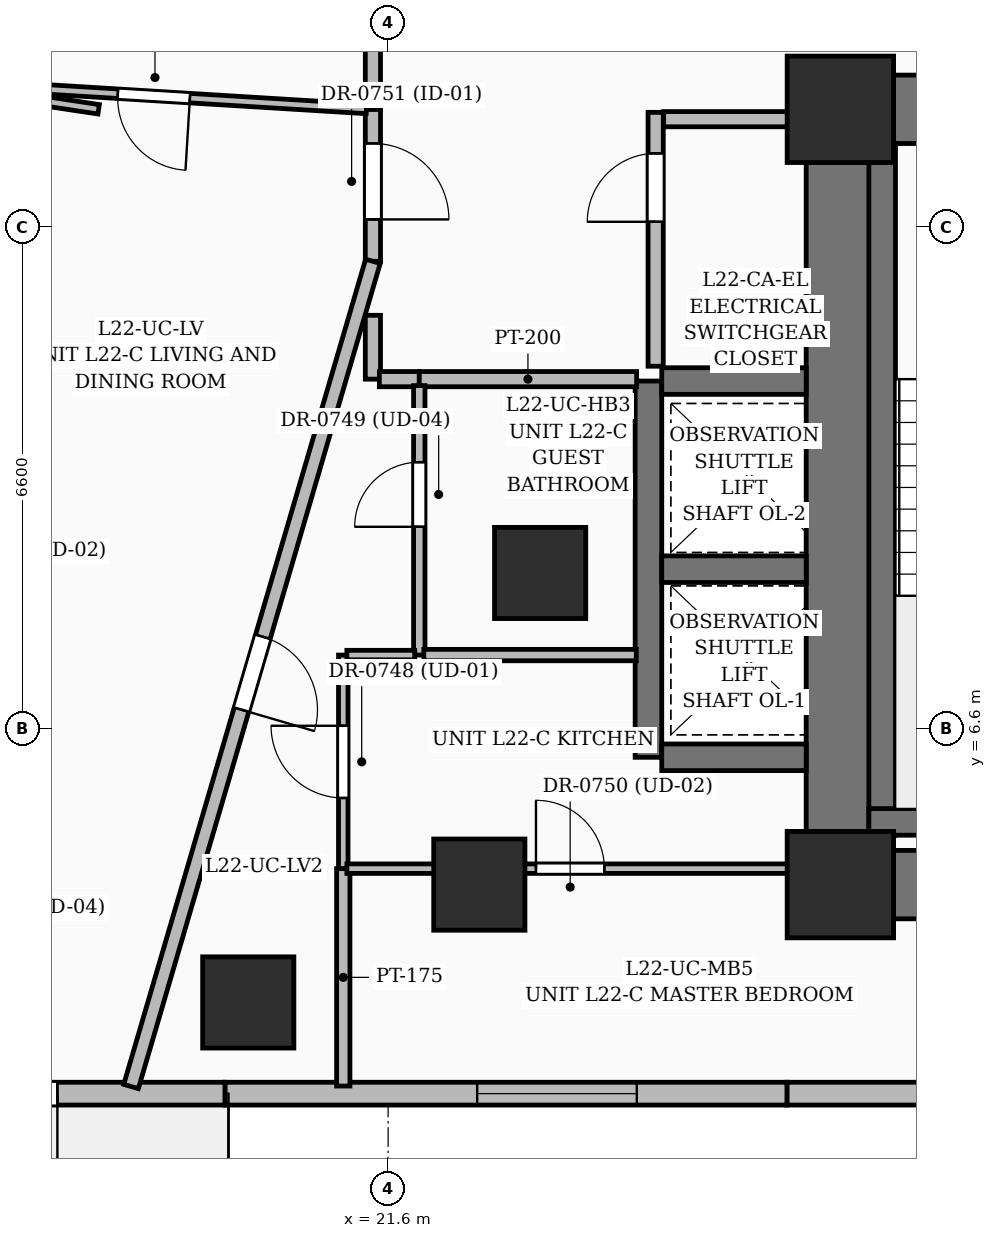
"""IFC4 building model, lengths in metres.
Left out: names, types, materials, properties, quantities, classifications, styles, units other than length and angle.
Written with IfcOpenShell. Run it as: python <this file> out.ifc"""

import sys

from ifc_helpers import new_model, si_unit, direction, frame, frame_2d, origin, origin_2d, place, context, subcontext, project, spatial, rectangle, extrude, element, fill, save


model = new_model("IFC4")
c1 = context("Model", 3, precision=1e-05, world=origin(), true_north=direction((0.0, 1.0)))
c2 = subcontext(c1, "Body", "Model", "MODEL_VIEW")
j1 = project(units=[si_unit("LENGTHUNIT", "METRE"), si_unit("PLANEANGLEUNIT", "RADIAN")], contexts=[c1])
p1 = place(None, origin())
s1 = spatial("IfcSite", under=j1, at=p1, CompositionType="ELEMENT")
p2 = place(p1, origin())
s2 = spatial("IfcBuilding", under=s1, at=p2, CompositionType="ELEMENT")
p3 = place(p2, frame((0.0, 0.0, 89.4)))
s3 = spatial("IfcBuildingStorey", under=s2, at=p3, CompositionType="ELEMENT", Elevation=89.4)
for number, where, z_axis, x_axis in (
    (1, (27.55, 4.55, 0.0), (0.0, 0.0, 1.0), (1.0, 0.0, 0.0)),
    (2, (27.55, 14.75, 0.0), (0.0, 0.0, 1.0), (1.0, 0.0, 0.0)),
):
    element("IfcColumn", number, at=place(p3, frame(where, z_axis=z_axis, x_axis=x_axis)), inside=s3, PredefinedType="COLUMN", context=c2, shape_type="SweptSolid", body=[
        extrude(rectangle(XDim=1.4, YDim=1.4, at=origin_2d()), origin(), (0.0, 0.0, 1.0), 3.6),
    ])
for number, where, z_axis, x_axis in (
    (3, (22.8, 4.55, 0.0), (0.0, 0.0, 1.0), (1.0, 0.0, 0.0)),
    (4, (23.6, 8.65, 0.0), (0.0, 0.0, 1.0), (1.0, 0.0, 0.0)),
):
    element("IfcColumn", number, at=place(p3, frame(where, z_axis=z_axis, x_axis=x_axis)), inside=s3, PredefinedType="COLUMN", context=c2, shape_type="SweptSolid", body=[
        extrude(rectangle(XDim=1.2, YDim=1.2, at=origin_2d()), origin(), (0.0, 0.0, 1.0), 3.6),
    ])
p4 = place(p3, frame((28.25, 4.55, 0.0), z_axis=(0.0, 0.0, 1.0), x_axis=(1.0, 0.0, 0.0)))
e5 = element("IfcWall", 5, at=p4, inside=s3, PredefinedType="SHEAR", context=c2, shape_type="SweptSolid", body=[
    extrude(rectangle(XDim=6.2, YDim=0.9, at=frame_2d((3.1, 0.0))), origin(), (0.0, 0.0, 1.0), 3.6),
])
p5 = place(p3, frame((28.25, 14.75, 0.0), z_axis=(0.0, 0.0, 1.0), x_axis=(1.0, 0.0, 0.0)))
e6 = element("IfcWall", 6, at=p5, inside=s3, PredefinedType="SHEAR", context=c2, shape_type="SweptSolid", body=[
    extrude(rectangle(XDim=6.2, YDim=0.9, at=frame_2d((3.1, 0.0))), origin(), (0.0, 0.0, 1.0), 3.6),
])
p6 = place(p5, frame((0.925, 0.0, 0.0)))
e7 = element("IfcOpeningElement", 7, at=p6, cuts=e6, PredefinedType="OPENING", context=c2, shape_type="SweptSolid", body=[
    extrude(rectangle(XDim=1.05, YDim=2.15, at=frame_2d((0.525, 1.075))), frame((0.0, 0.46, 0.0), z_axis=(0.0, -1.0, 0.0), x_axis=(1.0, 0.0, 0.0)), (0.0, 0.0, 1.0), 0.92),
])
p7 = place(p3, frame((27.55, 5.25, 0.0), z_axis=(0.0, 0.0, 1.0), x_axis=(0.0, 1.0, 0.0)))
e8 = element("IfcWall", 8, at=p7, inside=s3, PredefinedType="SHEAR", context=c2, shape_type="SweptSolid", body=[
    extrude(rectangle(XDim=8.8, YDim=0.9, at=frame_2d((4.4, 0.0))), origin(), (0.0, 0.0, 1.0), 3.6),
])
p8 = place(p3, frame((28.1, 5.2, 0.0), z_axis=(0.0, 0.0, 1.0), x_axis=(0.0, 1.0, 0.0)))
e9 = element("IfcWall", 9, at=p8, inside=s3, PredefinedType="SOLIDWALL", context=c2, shape_type="SweptSolid", body=[
    extrude(rectangle(XDim=9.1, YDim=0.35, at=frame_2d((4.55, 0.0))), origin(), (0.0, 0.0, 1.0), 3.6),
])
p9 = place(p3, frame((27.925, 5.375, 0.0), z_axis=(0.0, 0.0, 1.0), x_axis=(1.0, 0.0, 0.0)))
e10 = element("IfcWall", 10, at=p9, inside=s3, PredefinedType="SOLIDWALL", context=c2, shape_type="SweptSolid", body=[
    extrude(rectangle(XDim=3.55, YDim=0.35, at=frame_2d((1.775, 0.0))), origin(), (0.0, 0.0, 1.0), 3.6),
])
p10 = place(p3, frame((25.025, 6.225, 0.0), z_axis=(0.0, 0.0, 1.0), x_axis=(0.0, 1.0, 0.0)))
e11 = element("IfcWall", 11, at=p10, inside=s3, PredefinedType="SOLIDWALL", context=c2, shape_type="SweptSolid", body=[
    extrude(rectangle(XDim=4.95, YDim=0.35, at=frame_2d((2.475, 0.0))), origin(), (0.0, 0.0, 1.0), 3.6),
])
for number, where, z_axis, x_axis in (
    (12, (25.2, 6.225, 0.0), (0.0, 0.0, 1.0), (1.0, 0.0, 0.0)),
    (13, (25.2, 8.7, 0.0), (0.0, 0.0, 1.0), (1.0, 0.0, 0.0)),
    (14, (25.2, 11.175, 0.0), (0.0, 0.0, 1.0), (1.0, 0.0, 0.0)),
):
    element("IfcWall", number, at=place(p3, frame(where, z_axis=z_axis, x_axis=x_axis)), inside=s3, PredefinedType="SOLIDWALL", context=c2, shape_type="SweptSolid", body=[
        extrude(rectangle(XDim=1.9, YDim=0.35, at=frame_2d((0.95, 0.0))), origin(), (0.0, 0.0, 1.0), 3.6),
    ])
p11 = place(p3, frame((19.76, 3.0, 0.0), z_axis=(0.0, 0.0, 1.0), x_axis=(1.0, 0.0, 0.0)))
e15 = element("IfcColumn", 15, at=p11, inside=s3, PredefinedType="COLUMN", context=c2, shape_type="SweptSolid", body=[
    extrude(rectangle(XDim=1.2, YDim=1.2, at=origin_2d()), origin(), (0.0, 0.0, 1.0), 3.6),
])
p12 = place(p3, frame((33.965, 1.8, 0.0), z_axis=(0.0, 0.0, 1.0), x_axis=(-1.0, 0.0, 0.0)))
e16 = element("IfcWall", 16, at=p12, inside=s3, PredefinedType="SOLIDWALL", context=c2, shape_type="SweptSolid", body=[
    extrude(rectangle(XDim=7.118, YDim=0.3, at=frame_2d((3.559, 0.0))), origin(), (0.0, 0.0, 1.0), 3.35),
])
p13 = place(p3, frame((26.847, 1.8, 0.0), z_axis=(0.0, 0.0, 1.0), x_axis=(-1.0, 0.0, 0.0)))
e17 = element("IfcWall", 17, at=p13, inside=s3, PredefinedType="SOLIDWALL", context=c2, shape_type="SweptSolid", body=[
    extrude(rectangle(XDim=7.393, YDim=0.3, at=frame_2d((3.697, 0.0))), origin(), (0.0, 0.0, 1.0), 3.35),
])
p14 = place(p13, frame((1.975, 0.0, 0.55)))
e18 = element("IfcOpeningElement", 18, at=p14, cuts=e17, PredefinedType="OPENING", context=c2, shape_type="SweptSolid", body=[
    extrude(rectangle(XDim=2.1, YDim=2.4, at=frame_2d((1.05, 1.2))), frame((0.0, 0.16, 0.0), z_axis=(0.0, -1.0, 0.0), x_axis=(1.0, 0.0, 0.0)), (0.0, 0.0, 1.0), 0.32),
])
p15 = place(p3, frame((19.453, 1.8, 0.0), z_axis=(0.0, 0.0, 1.0), x_axis=(-1.0, 0.0, 0.0)))
e19 = element("IfcWall", 19, at=p15, inside=s3, PredefinedType="SOLIDWALL", context=c2, shape_type="SweptSolid", body=[
    extrude(rectangle(XDim=7.393, YDim=0.3, at=frame_2d((3.697, 0.0))), origin(), (0.0, 0.0, 1.0), 3.35),
])
p16 = place(p15, frame((2.204, 0.0, 0.0)))
e20 = element("IfcOpeningElement", 20, at=p16, cuts=e19, PredefinedType="OPENING", context=c2, shape_type="SweptSolid", body=[
    extrude(rectangle(XDim=1.0, YDim=2.2, at=frame_2d((0.5, 1.1))), frame((0.0, 0.16, 0.0), z_axis=(0.0, -1.0, 0.0), x_axis=(1.0, 0.0, 0.0)), (0.0, 0.0, 1.0), 0.32),
])
p17 = place(p3, frame((13.437, 11.846, 0.0), z_axis=(0.0, 0.0, 1.0), x_axis=(0.539467581629, 0.842006370743, 0.0)))
e21 = element("IfcWall", 21, at=p17, inside=s3, PredefinedType="SOLIDWALL", context=c2, shape_type="SweptSolid", body=[
    extrude(rectangle(XDim=7.13, YDim=0.3, at=frame_2d((3.565, 0.0))), origin(), (0.0, 0.0, 1.0), 3.35),
])
p18 = place(p3, frame((25.12, 11.37, 0.0), z_axis=(0.0, 0.0, 1.0), x_axis=(0.0, 1.0, 0.0)))
e22 = element("IfcWall", 22, at=p18, inside=s3, PredefinedType="PARTITIONING", context=c2, shape_type="SweptSolid", body=[
    extrude(rectangle(XDim=3.34, YDim=0.2, at=frame_2d((1.67, 0.0))), origin(), (0.0, 0.0, 1.0), 3.35),
])
p19 = place(p18, frame((1.9, 0.0, 0.0)))
e23 = element("IfcOpeningElement", 23, at=p19, cuts=e22, PredefinedType="OPENING", context=c2, shape_type="SweptSolid", body=[
    extrude(rectangle(XDim=0.9, YDim=2.1, at=frame_2d((0.45, 1.05))), frame((0.0, 0.11, 0.0), z_axis=(0.0, -1.0, 0.0), x_axis=(1.0, 0.0, 0.0)), (0.0, 0.0, 1.0), 0.22),
])
p20 = place(p3, frame((25.225, 14.62, 0.0), z_axis=(0.0, 0.0, 1.0), x_axis=(1.0, 0.0, 0.0)))
e24 = element("IfcWall", 24, at=p20, inside=s3, PredefinedType="PARTITIONING", context=c2, shape_type="SweptSolid", body=[
    extrude(rectangle(XDim=1.86, YDim=0.2, at=frame_2d((0.93, 0.0))), origin(), (0.0, 0.0, 1.0), 3.35),
])
p21 = place(p3, frame((21.4, 12.04, 0.0), z_axis=(0.0, 0.0, 1.0), x_axis=(0.0, -1.0, 0.0)))
e25 = element("IfcWall", 25, at=p21, inside=s3, PredefinedType="PARTITIONING", context=c2, shape_type="SweptSolid", body=[
    extrude(rectangle(XDim=0.84, YDim=0.2, at=frame_2d((0.42, 0.0))), origin(), (0.0, 0.0, 1.0), 3.35),
])
p22 = place(p3, frame((21.485, 11.2, 0.0), z_axis=(0.0, 0.0, 1.0), x_axis=(1.0, 0.0, 0.0)))
e26 = element("IfcWall", 26, at=p22, inside=s3, PredefinedType="PARTITIONING", context=c2, shape_type="SweptSolid", body=[
    extrude(rectangle(XDim=0.525, YDim=0.2, at=frame_2d((0.262, 0.0))), origin(), (0.0, 0.0, 1.0), 3.35),
])
p23 = place(p3, frame((22.01, 11.2, 0.0), z_axis=(0.0, 0.0, 1.0), x_axis=(1.0, 0.0, 0.0)))
e27 = element("IfcWall", 27, at=p23, inside=s3, PredefinedType="PARTITIONING", context=c2, shape_type="SweptSolid", body=[
    extrude(rectangle(XDim=2.859, YDim=0.2, at=frame_2d((1.43, 0.0))), origin(), (0.0, 0.0, 1.0), 3.35),
])
p24 = place(p3, frame((21.4, 14.75, 0.0), z_axis=(0.0, 0.0, 1.0), x_axis=(0.0, -1.0, 0.0)))
e28 = element("IfcWall", 28, at=p24, inside=s3, PredefinedType="PARTITIONING", context=c2, shape_type="SweptSolid", body=[
    extrude(rectangle(XDim=2.0, YDim=0.2, at=frame_2d((1.0, 0.0))), origin(), (0.0, 0.0, 1.0), 2.771),
])
p25 = place(p24, frame((0.448, 0.0, 0.0)))
e29 = element("IfcOpeningElement", 29, at=p25, cuts=e28, PredefinedType="OPENING", context=c2, shape_type="SweptSolid", body=[
    extrude(rectangle(XDim=1.0, YDim=2.2, at=frame_2d((0.5, 1.1))), frame((0.0, 0.11, 0.0), z_axis=(0.0, -1.0, 0.0), x_axis=(1.0, 0.0, 0.0)), (0.0, 0.0, 1.0), 0.22),
])
p26 = place(p3, frame((21.4, 17.75, 0.0), z_axis=(0.0, 0.0, 1.0), x_axis=(0.0, -1.0, 0.0)))
e30 = element("IfcWall", 30, at=p26, inside=s3, PredefinedType="PARTITIONING", context=c2, shape_type="SweptSolid", body=[
    extrude(rectangle(XDim=3.0, YDim=0.2, at=frame_2d((1.5, 0.0))), origin(), (0.0, 0.0, 1.0), 2.771),
])
p27 = place(p26, frame((1.084, 0.0, 0.0)))
e31 = element("IfcOpeningElement", 31, at=p27, cuts=e30, PredefinedType="OPENING", context=c2, shape_type="SweptSolid", body=[
    extrude(rectangle(XDim=0.95, YDim=2.2, at=frame_2d((0.475, 1.1))), frame((0.0, 0.11, 0.0), z_axis=(0.0, -1.0, 0.0), x_axis=(1.0, 0.0, 0.0)), (0.0, 0.0, 1.0), 0.22),
])
p28 = place(p3, frame((22.01, 7.57, 0.0), z_axis=(0.0, 0.0, 1.0), x_axis=(0.0, 1.0, 0.0)))
e32 = element("IfcWall", 32, at=p28, inside=s3, PredefinedType="PARTITIONING", context=c2, shape_type="SweptSolid", body=[
    extrude(rectangle(XDim=3.545, YDim=0.15, at=frame_2d((1.772, 0.0))), origin(), (0.0, 0.0, 1.0), 2.345),
])
p29 = place(p28, frame((1.688, 0.0, 0.0)))
e33 = element("IfcOpeningElement", 33, at=p29, cuts=e32, PredefinedType="OPENING", context=c2, shape_type="SweptSolid", body=[
    extrude(rectangle(XDim=0.85, YDim=2.1, at=frame_2d((0.425, 1.05))), frame((0.0, 0.085, 0.0), z_axis=(0.0, -1.0, 0.0), x_axis=(1.0, 0.0, 0.0)), (0.0, 0.0, 1.0), 0.17),
])
p30 = place(p3, frame((21.01, 4.76, 0.0), z_axis=(0.0, 0.0, 1.0), x_axis=(0.0, 1.0, 0.0)))
e34 = element("IfcWall", 34, at=p30, inside=s3, PredefinedType="PARTITIONING", context=c2, shape_type="SweptSolid", body=[
    extrude(rectangle(XDim=2.81, YDim=0.125, at=frame_2d((1.405, 0.0))), origin(), (0.0, 0.0, 1.0), 3.35),
])
p31 = place(p30, frame((0.93, 0.0, 0.0)))
e35 = element("IfcOpeningElement", 35, at=p31, cuts=e34, PredefinedType="OPENING", context=c2, shape_type="SweptSolid", body=[
    extrude(rectangle(XDim=0.95, YDim=2.2, at=frame_2d((0.475, 1.1))), frame((0.0, 0.072, 0.0), z_axis=(0.0, -1.0, 0.0), x_axis=(1.0, 0.0, 0.0)), (0.0, 0.0, 1.0), 0.145),
])
p32 = place(p3, frame((21.058, 7.57, 0.0), z_axis=(0.0, 0.0, 1.0), x_axis=(1.0, 0.0, 0.0)))
e36 = element("IfcWall", 36, at=p32, inside=s3, PredefinedType="PARTITIONING", context=c2, shape_type="SweptSolid", body=[
    extrude(rectangle(XDim=0.892, YDim=0.125, at=frame_2d((0.446, 0.0))), origin(), (0.0, 0.0, 1.0), 2.771),
])
p33 = place(p3, frame((21.01, 1.9, 0.0), z_axis=(0.0, 0.0, 1.0), x_axis=(0.0, 1.0, 0.0)))
e37 = element("IfcWall", 37, at=p33, inside=s3, PredefinedType="PARTITIONING", context=c2, shape_type="SweptSolid", body=[
    extrude(rectangle(XDim=2.86, YDim=0.175, at=frame_2d((1.43, 0.0))), origin(), (0.0, 0.0, 1.0), 2.345),
])
p34 = place(p3, frame((21.4, 12.75, 0.0), z_axis=(0.0, 0.0, 1.0), x_axis=(-0.281267694056, -0.959629347342, 0.0)))
e38 = element("IfcWall", 38, at=p34, inside=s3, PredefinedType="PARTITIONING", context=c2, shape_type="SweptSolid", body=[
    extrude(rectangle(XDim=11.313, YDim=0.2, at=frame_2d((5.656, 0.0))), origin(), (0.0, 0.0, 1.0), 2.345),
])
p35 = place(p34, frame((5.147, 0.0, 0.0)))
e39 = element("IfcOpeningElement", 39, at=p35, cuts=e38, PredefinedType="OPENING", context=c2, shape_type="SweptSolid", body=[
    extrude(rectangle(XDim=1.0, YDim=2.2, at=frame_2d((0.5, 1.1))), frame((0.0, 0.11, 0.0), z_axis=(0.0, -1.0, 0.0), x_axis=(1.0, 0.0, 0.0)), (0.0, 0.0, 1.0), 0.22),
])
p36 = place(p3, frame((22.07, 7.57, 0.0), z_axis=(0.0, 0.0, 1.0), x_axis=(1.0, 0.0, 0.0)))
e40 = element("IfcWall", 40, at=p36, inside=s3, PredefinedType="PARTITIONING", context=c2, shape_type="SweptSolid", body=[
    extrude(rectangle(XDim=2.795, YDim=0.15, at=frame_2d((1.397, 0.0))), origin(), (0.0, 0.0, 1.0), 3.35),
])
p37 = place(p3, frame((21.058, 4.76, 0.0), z_axis=(0.0, 0.0, 1.0), x_axis=(1.0, 0.0, 0.0)))
e41 = element("IfcWall", 41, at=p37, inside=s3, PredefinedType="PARTITIONING", context=c2, shape_type="SweptSolid", body=[
    extrude(rectangle(XDim=6.042, YDim=0.125, at=frame_2d((3.021, 0.0))), origin(), (0.0, 0.0, 1.0), 2.309),
])
p38 = place(p37, frame((2.488, 0.0, 0.0)))
e42 = element("IfcOpeningElement", 42, at=p38, cuts=e41, PredefinedType="OPENING", context=c2, shape_type="SweptSolid", body=[
    extrude(rectangle(XDim=0.9, YDim=2.15, at=frame_2d((0.45, 1.075))), frame((0.0, 0.072, 0.0), z_axis=(0.0, -1.0, 0.0), x_axis=(1.0, 0.0, 0.0)), (0.0, 0.0, 1.0), 0.145),
])
p39 = place(p3, frame((21.315, 14.755, 0.0), z_axis=(0.0, 0.0, 1.0), x_axis=(-0.99813414118, 0.061059284391, 0.0)))
e43 = element("IfcWall", 43, at=p39, inside=s3, PredefinedType="PARTITIONING", context=c2, shape_type="SweptSolid", body=[
    extrude(rectangle(XDim=5.67, YDim=0.125, at=frame_2d((2.835, 0.0))), origin(), (0.0, 0.0, 1.0), 2.37),
])
p40 = place(p39, frame((2.327, 0.0, 0.0)))
e44 = element("IfcOpeningElement", 44, at=p40, cuts=e43, PredefinedType="OPENING", context=c2, shape_type="SweptSolid", body=[
    extrude(rectangle(XDim=0.95, YDim=2.2, at=frame_2d((0.475, 1.1))), frame((0.0, 0.072, 0.0), z_axis=(0.0, -1.0, 0.0), x_axis=(1.0, 0.0, 0.0)), (0.0, 0.0, 1.0), 0.145),
])
p41 = place(p3, frame((17.792, 14.75, 0.0), z_axis=(0.0, 0.0, 1.0), x_axis=(-0.988863080903, 0.14882811303, 0.0)))
e45 = element("IfcWall", 45, at=p41, inside=s3, PredefinedType="PARTITIONING", context=c2, shape_type="SweptSolid", body=[
    extrude(rectangle(XDim=0.955, YDim=0.125, at=frame_2d((0.478, 0.0))), origin(), (0.0, 0.0, 1.0), 2.37),
])
p42 = place(p14, origin())
e46 = element("IfcWindow", 46, at=p42, inside=s3, PartitioningType="SINGLE_PANEL", PredefinedType="WINDOW", context=c2, shape_type="SweptSolid", body=[
    extrude(rectangle(XDim=2.1, YDim=2.4, at=frame_2d((1.05, 1.2))), frame((0.0, 0.03, 0.0), z_axis=(0.0, -1.0, 0.0), x_axis=(1.0, 0.0, 0.0)), (0.0, 0.0, 1.0), 0.06),
])
fill(e18, e46)
p43 = place(p16, origin())
e47 = element("IfcDoor", 47, at=p43, inside=s3, OperationType="SINGLE_SWING_LEFT", PredefinedType="DOOR", context=c2, shape_type="SweptSolid", body=[
    extrude(rectangle(XDim=1.0, YDim=2.2, at=frame_2d((0.5, 1.1))), frame((0.0, 0.025, 0.0), z_axis=(0.0, -1.0, 0.0), x_axis=(1.0, 0.0, 0.0)), (0.0, 0.0, 1.0), 0.05),
])
fill(e20, e47)
p44 = place(p19, origin())
e48 = element("IfcDoor", 48, at=p44, inside=s3, OperationType="SINGLE_SWING_LEFT", PredefinedType="DOOR", context=c2, shape_type="SweptSolid", body=[
    extrude(rectangle(XDim=0.9, YDim=2.1, at=frame_2d((0.45, 1.05))), frame((0.0, 0.025, 0.0), z_axis=(0.0, -1.0, 0.0), x_axis=(1.0, 0.0, 0.0)), (0.0, 0.0, 1.0), 0.05),
])
fill(e23, e48)
p45 = place(p31, origin())
e49 = element("IfcDoor", 49, at=p45, inside=s3, OperationType="SINGLE_SWING_RIGHT", PredefinedType="DOOR", context=c2, shape_type="SweptSolid", body=[
    extrude(rectangle(XDim=0.95, YDim=2.2, at=frame_2d((0.475, 1.1))), frame((0.0, 0.025, 0.0), z_axis=(0.0, -1.0, 0.0), x_axis=(1.0, 0.0, 0.0)), (0.0, 0.0, 1.0), 0.05),
])
fill(e35, e49)
p46 = place(p29, origin())
e50 = element("IfcDoor", 50, at=p46, inside=s3, OperationType="SINGLE_SWING_LEFT", PredefinedType="DOOR", context=c2, shape_type="SweptSolid", body=[
    extrude(rectangle(XDim=0.85, YDim=2.1, at=frame_2d((0.425, 1.05))), frame((0.0, 0.025, 0.0), z_axis=(0.0, -1.0, 0.0), x_axis=(1.0, 0.0, 0.0)), (0.0, 0.0, 1.0), 0.05),
])
fill(e33, e50)
p47 = place(p38, origin())
e51 = element("IfcDoor", 51, at=p47, inside=s3, OperationType="SINGLE_SWING_LEFT", PredefinedType="DOOR", context=c2, shape_type="SweptSolid", body=[
    extrude(rectangle(XDim=0.9, YDim=2.15, at=frame_2d((0.45, 1.075))), frame((0.0, 0.025, 0.0), z_axis=(0.0, -1.0, 0.0), x_axis=(1.0, 0.0, 0.0)), (0.0, 0.0, 1.0), 0.05),
])
fill(e42, e51)
p48 = place(p25, origin())
e52 = element("IfcDoor", 52, at=p48, inside=s3, OperationType="SINGLE_SWING_RIGHT", PredefinedType="DOOR", context=c2, shape_type="SweptSolid", body=[
    extrude(rectangle(XDim=1.0, YDim=2.2, at=frame_2d((0.5, 1.1))), frame((0.0, 0.025, 0.0), z_axis=(0.0, -1.0, 0.0), x_axis=(1.0, 0.0, 0.0)), (0.0, 0.0, 1.0), 0.05),
])
fill(e29, e52)
p49 = place(p40, origin())
e53 = element("IfcDoor", 53, at=p49, inside=s3, OperationType="SINGLE_SWING_LEFT", PredefinedType="DOOR", context=c2, shape_type="SweptSolid", body=[
    extrude(rectangle(XDim=0.95, YDim=2.2, at=frame_2d((0.475, 1.1))), frame((0.0, 0.025, 0.0), z_axis=(0.0, -1.0, 0.0), x_axis=(1.0, 0.0, 0.0)), (0.0, 0.0, 1.0), 0.05),
])
fill(e44, e53)
p50 = place(p35, origin())
e54 = element("IfcDoor", 54, at=p50, inside=s3, OperationType="SINGLE_SWING_RIGHT", PredefinedType="DOOR", context=c2, shape_type="SweptSolid", body=[
    extrude(rectangle(XDim=1.0, YDim=2.2, at=frame_2d((0.5, 1.1))), frame((0.0, 0.025, 0.0), z_axis=(0.0, -1.0, 0.0), x_axis=(1.0, 0.0, 0.0)), (0.0, 0.0, 1.0), 0.05),
])
fill(e39, e54)
save(model, sys.argv[1])
